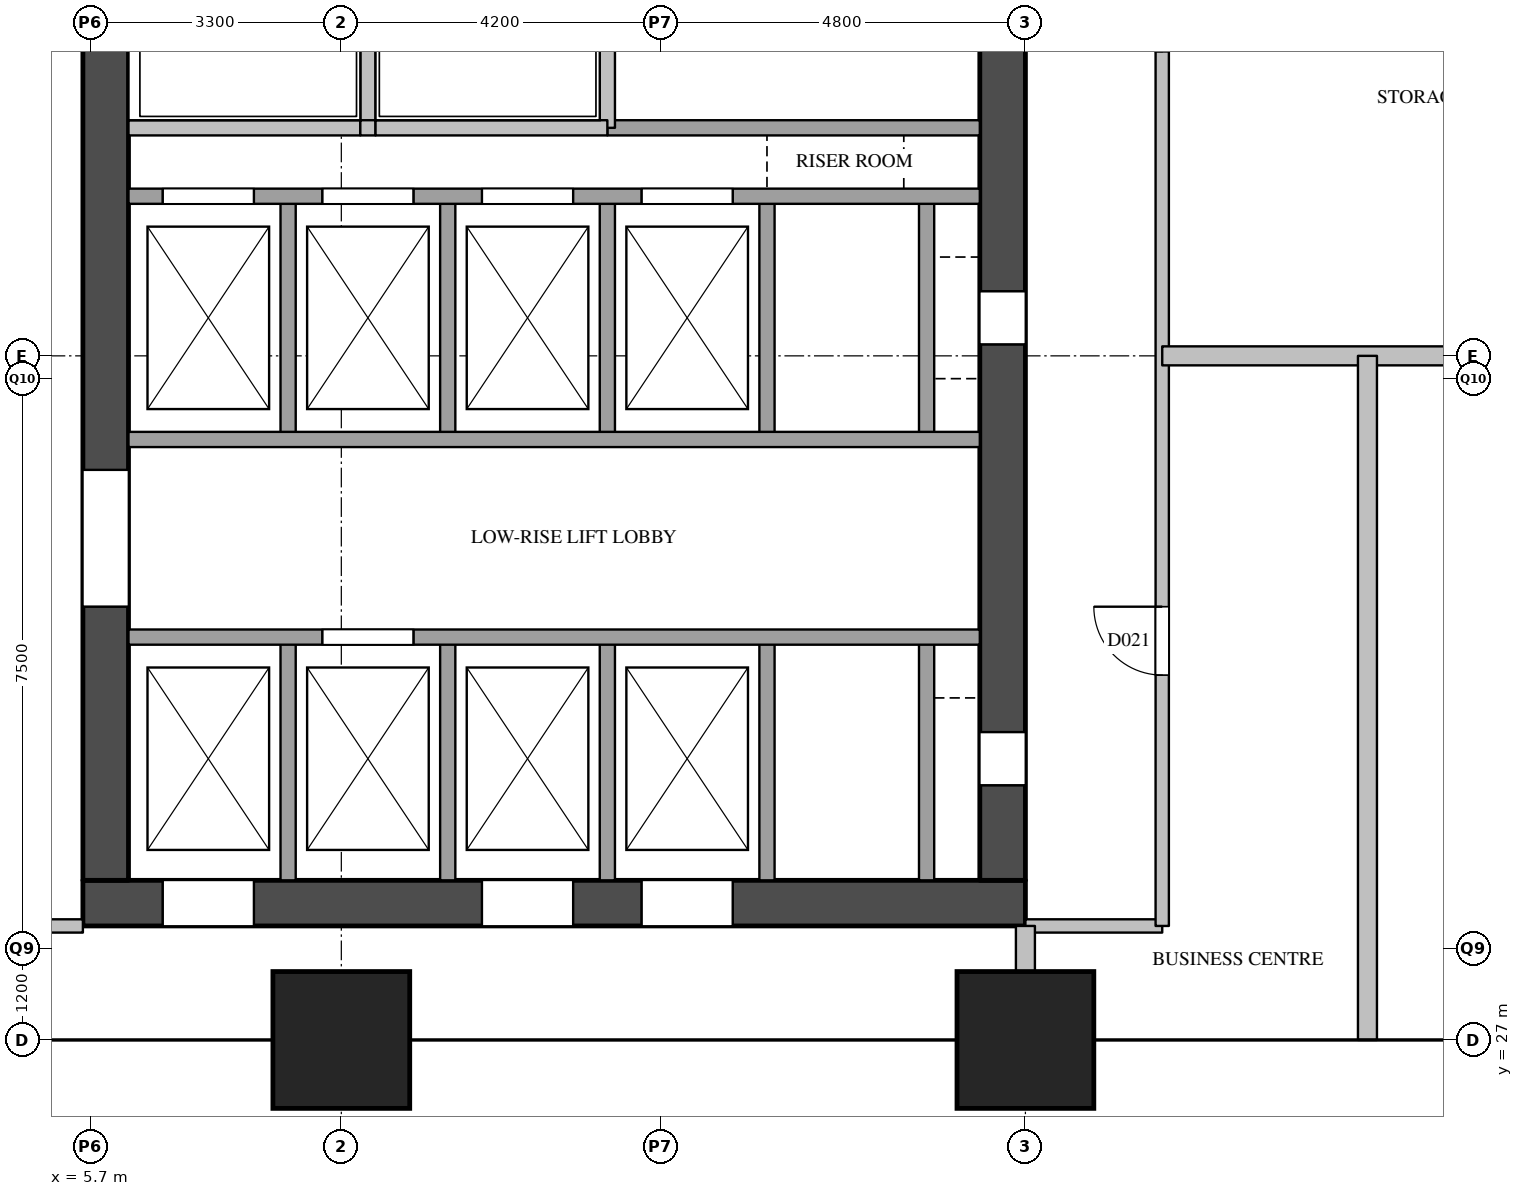
"""IFC4 building model, lengths in metres.
Left out: names, types, materials, properties, quantities, classifications, styles, units other than length and angle.
Written with IfcOpenShell. Run it as: python <this file> out.ifc"""

import sys

from ifc_helpers import new_model, si_unit, direction, frame, frame_2d, origin, origin_2d, place, context, subcontext, project, spatial, rectangle, extrude, element, fill, save


model = new_model("IFC4")
c1 = context("Model", 3, precision=1e-05, world=origin(), true_north=direction((0.0, 1.0)))
c2 = subcontext(c1, "Body", "Model", "MODEL_VIEW")
j1 = project(units=[si_unit("LENGTHUNIT", "METRE"), si_unit("PLANEANGLEUNIT", "RADIAN")], contexts=[c1])
p1 = place(None, origin())
s1 = spatial("IfcSite", under=j1, at=p1, CompositionType="ELEMENT")
p2 = place(p1, origin())
s2 = spatial("IfcBuilding", under=s1, at=p2, CompositionType="ELEMENT")
p3 = place(p2, frame((0.0, 0.0, 104.4)))
s3 = spatial("IfcBuildingStorey", under=s2, at=p3, CompositionType="ELEMENT", Elevation=104.4)
for number, where, z_axis, x_axis in (
    (1, (9.0, 27.0, 0.0), (0.0, 0.0, 1.0), (1.0, 0.0, 0.0)),
    (2, (18.0, 27.0, 0.0), (0.0, 0.0, 1.0), (1.0, 0.0, 0.0)),
):
    element("IfcColumn", number, at=place(p3, frame(where, z_axis=z_axis, x_axis=x_axis)), inside=s3, PredefinedType="COLUMN", context=c2, shape_type="SweptSolid", body=[
        extrude(rectangle(XDim=1.8, YDim=1.8, at=origin_2d()), origin(), (0.0, 0.0, 1.0), 3.8),
    ])
p4 = place(p3, frame((5.6, 28.8, 0.0), z_axis=(0.0, 0.0, 1.0), x_axis=(1.0, 0.0, 0.0)))
e3 = element("IfcWall", 3, at=p4, inside=s3, PredefinedType="SHEAR", context=c2, shape_type="SweptSolid", body=[
    extrude(rectangle(XDim=12.4, YDim=0.6, at=frame_2d((6.2, 0.0))), origin(), (0.0, 0.0, 1.0), 3.5),
])
p5 = place(p4, frame((1.05, 0.0, 0.0)))
e4 = element("IfcOpeningElement", 4, at=p5, cuts=e3, PredefinedType="OPENING", context=c2, shape_type="SweptSolid", body=[
    extrude(rectangle(XDim=1.2, YDim=2.1, at=frame_2d((0.6, 1.05))), frame((0.0, 0.31, 0.0), z_axis=(0.0, -1.0, 0.0), x_axis=(1.0, 0.0, 0.0)), (0.0, 0.0, 1.0), 0.62),
])
p6 = place(p4, frame((5.25, 0.0, 0.0)))
e5 = element("IfcOpeningElement", 5, at=p6, cuts=e3, PredefinedType="OPENING", context=c2, shape_type="SweptSolid", body=[
    extrude(rectangle(XDim=1.2, YDim=2.1, at=frame_2d((0.6, 1.05))), frame((0.0, 0.31, 0.0), z_axis=(0.0, -1.0, 0.0), x_axis=(1.0, 0.0, 0.0)), (0.0, 0.0, 1.0), 0.62),
])
p7 = place(p4, frame((7.35, 0.0, 0.0)))
e6 = element("IfcOpeningElement", 6, at=p7, cuts=e3, PredefinedType="OPENING", context=c2, shape_type="SweptSolid", body=[
    extrude(rectangle(XDim=1.2, YDim=2.1, at=frame_2d((0.6, 1.05))), frame((0.0, 0.31, 0.0), z_axis=(0.0, -1.0, 0.0), x_axis=(1.0, 0.0, 0.0)), (0.0, 0.0, 1.0), 0.62),
])
p8 = place(p3, frame((5.9, 29.1, 0.0), z_axis=(0.0, 0.0, 1.0), x_axis=(0.0, 1.0, 0.0)))
e7 = element("IfcWall", 7, at=p8, inside=s3, PredefinedType="SHEAR", context=c2, shape_type="SweptSolid", body=[
    extrude(rectangle(XDim=20.3, YDim=0.6, at=frame_2d((10.15, 0.0))), origin(), (0.0, 0.0, 1.0), 3.5),
])
p9 = place(p8, frame((3.6, 0.0, 0.0)))
e8 = element("IfcOpeningElement", 8, at=p9, cuts=e7, PredefinedType="OPENING", context=c2, shape_type="SweptSolid", body=[
    extrude(rectangle(XDim=1.8, YDim=2.1, at=frame_2d((0.9, 1.05))), frame((0.0, 0.31, 0.0), z_axis=(0.0, -1.0, 0.0), x_axis=(1.0, 0.0, 0.0)), (0.0, 0.0, 1.0), 0.62),
])
p10 = place(p8, frame((16.4, 0.0, 0.0)))
e9 = element("IfcOpeningElement", 9, at=p10, cuts=e7, PredefinedType="OPENING", context=c2, shape_type="SweptSolid", body=[
    extrude(rectangle(XDim=1.0, YDim=2.1, at=frame_2d((0.5, 1.05))), frame((0.0, 0.31, 0.0), z_axis=(0.0, -1.0, 0.0), x_axis=(1.0, 0.0, 0.0)), (0.0, 0.0, 1.0), 0.62),
])
p11 = place(p3, frame((17.7, 29.1, 0.0), z_axis=(0.0, 0.0, 1.0), x_axis=(0.0, 1.0, 0.0)))
e10 = element("IfcWall", 10, at=p11, inside=s3, PredefinedType="SHEAR", context=c2, shape_type="SweptSolid", body=[
    extrude(rectangle(XDim=20.3, YDim=0.6, at=frame_2d((10.15, 0.0))), origin(), (0.0, 0.0, 1.0), 3.5),
])
p12 = place(p11, frame((1.25, 0.0, 0.0)))
e11 = element("IfcOpeningElement", 11, at=p12, cuts=e10, PredefinedType="OPENING", context=c2, shape_type="SweptSolid", body=[
    extrude(rectangle(XDim=0.7, YDim=2.1, at=frame_2d((0.35, 1.05))), frame((0.0, 0.31, 0.0), z_axis=(0.0, -1.0, 0.0), x_axis=(1.0, 0.0, 0.0)), (0.0, 0.0, 1.0), 0.62),
])
p13 = place(p11, frame((7.05, 0.0, 0.0)))
e12 = element("IfcOpeningElement", 12, at=p13, cuts=e10, PredefinedType="OPENING", context=c2, shape_type="SweptSolid", body=[
    extrude(rectangle(XDim=0.7, YDim=2.1, at=frame_2d((0.35, 1.05))), frame((0.0, 0.31, 0.0), z_axis=(0.0, -1.0, 0.0), x_axis=(1.0, 0.0, 0.0)), (0.0, 0.0, 1.0), 0.62),
])
p14 = place(p3, frame((8.3, 29.1, 0.0), z_axis=(0.0, 0.0, 1.0), x_axis=(0.0, 1.0, 0.0)))
e13 = element("IfcWall", 13, at=p14, inside=s3, PredefinedType="SOLIDWALL", context=c2, shape_type="SweptSolid", body=[
    extrude(rectangle(XDim=3.2, YDim=0.2, at=frame_2d((1.6, 0.0))), origin(), (0.0, 0.0, 1.0), 3.5),
])
p15 = place(p3, frame((8.3, 34.9, 0.0), z_axis=(0.0, 0.0, 1.0), x_axis=(0.0, 1.0, 0.0)))
e14 = element("IfcWall", 14, at=p15, inside=s3, PredefinedType="SOLIDWALL", context=c2, shape_type="SweptSolid", body=[
    extrude(rectangle(XDim=3.2, YDim=0.2, at=frame_2d((1.6, 0.0))), origin(), (0.0, 0.0, 1.0), 3.5),
])
p16 = place(p3, frame((9.35, 39.0, 0.0), z_axis=(0.0, 0.0, 1.0), x_axis=(0.0, 1.0, 0.0)))
e15 = element("IfcWall", 15, at=p16, inside=s3, PredefinedType="SOLIDWALL", context=c2, shape_type="SweptSolid", body=[
    extrude(rectangle(XDim=1.9, YDim=0.2, at=frame_2d((0.95, 0.0))), origin(), (0.0, 0.0, 1.0), 3.5),
])
p17 = place(p3, frame((10.4, 29.1, 0.0), z_axis=(0.0, 0.0, 1.0), x_axis=(0.0, 1.0, 0.0)))
e16 = element("IfcWall", 16, at=p17, inside=s3, PredefinedType="SOLIDWALL", context=c2, shape_type="SweptSolid", body=[
    extrude(rectangle(XDim=3.2, YDim=0.2, at=frame_2d((1.6, 0.0))), origin(), (0.0, 0.0, 1.0), 3.5),
])
p18 = place(p3, frame((10.4, 34.9, 0.0), z_axis=(0.0, 0.0, 1.0), x_axis=(0.0, 1.0, 0.0)))
e17 = element("IfcWall", 17, at=p18, inside=s3, PredefinedType="SOLIDWALL", context=c2, shape_type="SweptSolid", body=[
    extrude(rectangle(XDim=3.2, YDim=0.2, at=frame_2d((1.6, 0.0))), origin(), (0.0, 0.0, 1.0), 3.5),
])
p19 = place(p3, frame((12.5, 29.1, 0.0), z_axis=(0.0, 0.0, 1.0), x_axis=(0.0, 1.0, 0.0)))
e18 = element("IfcWall", 18, at=p19, inside=s3, PredefinedType="SOLIDWALL", context=c2, shape_type="SweptSolid", body=[
    extrude(rectangle(XDim=3.2, YDim=0.2, at=frame_2d((1.6, 0.0))), origin(), (0.0, 0.0, 1.0), 3.5),
])
p20 = place(p3, frame((12.5, 34.9, 0.0), z_axis=(0.0, 0.0, 1.0), x_axis=(0.0, 1.0, 0.0)))
e19 = element("IfcWall", 19, at=p20, inside=s3, PredefinedType="SOLIDWALL", context=c2, shape_type="SweptSolid", body=[
    extrude(rectangle(XDim=3.2, YDim=0.2, at=frame_2d((1.6, 0.0))), origin(), (0.0, 0.0, 1.0), 3.5),
])
p21 = place(p3, frame((12.5, 39.0, 0.0), z_axis=(0.0, 0.0, 1.0), x_axis=(0.0, 1.0, 0.0)))
e20 = element("IfcWall", 20, at=p21, inside=s3, PredefinedType="SOLIDWALL", context=c2, shape_type="SweptSolid", body=[
    extrude(rectangle(XDim=1.9, YDim=0.2, at=frame_2d((0.95, 0.0))), origin(), (0.0, 0.0, 1.0), 3.5),
])
p22 = place(p3, frame((14.6, 29.1, 0.0), z_axis=(0.0, 0.0, 1.0), x_axis=(0.0, 1.0, 0.0)))
e21 = element("IfcWall", 21, at=p22, inside=s3, PredefinedType="SOLIDWALL", context=c2, shape_type="SweptSolid", body=[
    extrude(rectangle(XDim=3.2, YDim=0.2, at=frame_2d((1.6, 0.0))), origin(), (0.0, 0.0, 1.0), 3.5),
])
p23 = place(p3, frame((14.6, 34.9, 0.0), z_axis=(0.0, 0.0, 1.0), x_axis=(0.0, 1.0, 0.0)))
e22 = element("IfcWall", 22, at=p23, inside=s3, PredefinedType="SOLIDWALL", context=c2, shape_type="SweptSolid", body=[
    extrude(rectangle(XDim=3.2, YDim=0.2, at=frame_2d((1.6, 0.0))), origin(), (0.0, 0.0, 1.0), 3.5),
])
p24 = place(p3, frame((16.7, 29.1, 0.0), z_axis=(0.0, 0.0, 1.0), x_axis=(0.0, 1.0, 0.0)))
e23 = element("IfcWall", 23, at=p24, inside=s3, PredefinedType="SOLIDWALL", context=c2, shape_type="SweptSolid", body=[
    extrude(rectangle(XDim=3.2, YDim=0.2, at=frame_2d((1.6, 0.0))), origin(), (0.0, 0.0, 1.0), 3.5),
])
p25 = place(p3, frame((16.7, 34.9, 0.0), z_axis=(0.0, 0.0, 1.0), x_axis=(0.0, 1.0, 0.0)))
e24 = element("IfcWall", 24, at=p25, inside=s3, PredefinedType="SOLIDWALL", context=c2, shape_type="SweptSolid", body=[
    extrude(rectangle(XDim=3.2, YDim=0.2, at=frame_2d((1.6, 0.0))), origin(), (0.0, 0.0, 1.0), 3.5),
])
p26 = place(p3, frame((6.2, 32.3, 0.0), z_axis=(0.0, 0.0, 1.0), x_axis=(1.0, 0.0, 0.0)))
e25 = element("IfcWall", 25, at=p26, inside=s3, PredefinedType="SOLIDWALL", context=c2, shape_type="SweptSolid", body=[
    extrude(rectangle(XDim=11.2, YDim=0.2, at=frame_2d((5.6, 0.0))), origin(), (0.0, 0.0, 1.0), 3.5),
])
p27 = place(p26, frame((2.55, 0.0, 0.0)))
e26 = element("IfcOpeningElement", 26, at=p27, cuts=e25, PredefinedType="OPENING", context=c2, shape_type="SweptSolid", body=[
    extrude(rectangle(XDim=1.2, YDim=2.1, at=frame_2d((0.6, 1.05))), frame((0.0, 0.11, 0.0), z_axis=(0.0, -1.0, 0.0), x_axis=(1.0, 0.0, 0.0)), (0.0, 0.0, 1.0), 0.22),
])
p28 = place(p3, frame((6.2, 34.9, 0.0), z_axis=(0.0, 0.0, 1.0), x_axis=(1.0, 0.0, 0.0)))
e27 = element("IfcWall", 27, at=p28, inside=s3, PredefinedType="SOLIDWALL", context=c2, shape_type="SweptSolid", body=[
    extrude(rectangle(XDim=11.2, YDim=0.2, at=frame_2d((5.6, 0.0))), origin(), (0.0, 0.0, 1.0), 3.5),
])
p29 = place(p3, frame((6.2, 38.1, 0.0), z_axis=(0.0, 0.0, 1.0), x_axis=(1.0, 0.0, 0.0)))
e28 = element("IfcWall", 28, at=p29, inside=s3, PredefinedType="SOLIDWALL", context=c2, shape_type="SweptSolid", body=[
    extrude(rectangle(XDim=11.2, YDim=0.2, at=frame_2d((5.6, 0.0))), origin(), (0.0, 0.0, 1.0), 3.5),
])
p30 = place(p29, frame((0.45, 0.0, 0.0)))
e29 = element("IfcOpeningElement", 29, at=p30, cuts=e28, PredefinedType="OPENING", context=c2, shape_type="SweptSolid", body=[
    extrude(rectangle(XDim=1.2, YDim=2.1, at=frame_2d((0.6, 1.05))), frame((0.0, 0.11, 0.0), z_axis=(0.0, -1.0, 0.0), x_axis=(1.0, 0.0, 0.0)), (0.0, 0.0, 1.0), 0.22),
])
p31 = place(p29, frame((2.55, 0.0, 0.0)))
e30 = element("IfcOpeningElement", 30, at=p31, cuts=e28, PredefinedType="OPENING", context=c2, shape_type="SweptSolid", body=[
    extrude(rectangle(XDim=1.2, YDim=2.1, at=frame_2d((0.6, 1.05))), frame((0.0, 0.11, 0.0), z_axis=(0.0, -1.0, 0.0), x_axis=(1.0, 0.0, 0.0)), (0.0, 0.0, 1.0), 0.22),
])
p32 = place(p29, frame((4.65, 0.0, 0.0)))
e31 = element("IfcOpeningElement", 31, at=p32, cuts=e28, PredefinedType="OPENING", context=c2, shape_type="SweptSolid", body=[
    extrude(rectangle(XDim=1.2, YDim=2.1, at=frame_2d((0.6, 1.05))), frame((0.0, 0.11, 0.0), z_axis=(0.0, -1.0, 0.0), x_axis=(1.0, 0.0, 0.0)), (0.0, 0.0, 1.0), 0.22),
])
p33 = place(p29, frame((6.75, 0.0, 0.0)))
e32 = element("IfcOpeningElement", 32, at=p33, cuts=e28, PredefinedType="OPENING", context=c2, shape_type="SweptSolid", body=[
    extrude(rectangle(XDim=1.2, YDim=2.1, at=frame_2d((0.6, 1.05))), frame((0.0, 0.11, 0.0), z_axis=(0.0, -1.0, 0.0), x_axis=(1.0, 0.0, 0.0)), (0.0, 0.0, 1.0), 0.22),
])
p34 = place(p3, frame((12.5, 39.0, 0.0), z_axis=(0.0, 0.0, 1.0), x_axis=(1.0, 0.0, 0.0)))
e33 = element("IfcWall", 33, at=p34, inside=s3, PredefinedType="SOLIDWALL", context=c2, shape_type="SweptSolid", body=[
    extrude(rectangle(XDim=4.9, YDim=0.2, at=frame_2d((2.45, 0.0))), origin(), (0.0, 0.0, 1.0), 3.5),
])
p35 = place(p3, frame((6.2, 39.0, 0.0), z_axis=(0.0, 0.0, 1.0), x_axis=(1.0, 0.0, 0.0)))
e34 = element("IfcWall", 34, at=p35, inside=s3, PredefinedType="SOLIDWALL", context=c2, shape_type="SweptSolid", body=[
    extrude(rectangle(XDim=3.05, YDim=0.2, at=frame_2d((1.525, 0.0))), origin(), (0.0, 0.0, 1.0), 3.5),
])
p36 = place(p3, frame((9.25, 39.0, 0.0), z_axis=(0.0, 0.0, 1.0), x_axis=(1.0, 0.0, 0.0)))
e35 = element("IfcWall", 35, at=p36, inside=s3, PredefinedType="SOLIDWALL", context=c2, shape_type="SweptSolid", body=[
    extrude(rectangle(XDim=0.2, YDim=0.2, at=frame_2d((0.1, 0.0))), origin(), (0.0, 0.0, 1.0), 3.5),
])
p37 = place(p3, frame((9.45, 39.0, 0.0), z_axis=(0.0, 0.0, 1.0), x_axis=(1.0, 0.0, 0.0)))
e36 = element("IfcWall", 36, at=p37, inside=s3, PredefinedType="SOLIDWALL", context=c2, shape_type="SweptSolid", body=[
    extrude(rectangle(XDim=3.05, YDim=0.2, at=frame_2d((1.525, 0.0))), origin(), (0.0, 0.0, 1.0), 3.5),
])
for number, where, z_axis, x_axis in (
    (37, (3.8, 28.5, 0.0), (0.0, 0.0, 1.0), (1.0, 0.0, 0.0)),
    (38, (18.0, 28.5, 0.0), (0.0, 0.0, 1.0), (1.0, 0.0, 0.0)),
):
    element("IfcWall", number, at=place(p3, frame(where, z_axis=z_axis, x_axis=x_axis)), inside=s3, PredefinedType="PARTITIONING", context=c2, shape_type="SweptSolid", body=[
        extrude(rectangle(XDim=1.8, YDim=0.175, at=frame_2d((0.9, 0.0))), origin(), (0.0, 0.0, 1.0), 3.5),
    ])
p38 = place(p3, frame((19.8, 28.5, 0.0), z_axis=(0.0, 0.0, 1.0), x_axis=(0.0, 1.0, 0.0)))
e39 = element("IfcWall", 39, at=p38, inside=s3, PredefinedType="PARTITIONING", context=c2, shape_type="SweptSolid", body=[
    extrude(rectangle(XDim=23.3, YDim=0.175, at=frame_2d((11.65, 0.0))), origin(), (0.0, 0.0, 1.0), 3.5),
])
p39 = place(p38, frame((3.3, 0.0, 0.0)))
e40 = element("IfcOpeningElement", 40, at=p39, cuts=e39, PredefinedType="OPENING", context=c2, shape_type="SweptSolid", body=[
    extrude(rectangle(XDim=0.9, YDim=2.1, at=frame_2d((0.45, 1.05))), frame((0.0, 0.097, 0.0), z_axis=(0.0, -1.0, 0.0), x_axis=(1.0, 0.0, 0.0)), (0.0, 0.0, 1.0), 0.195),
])
p40 = place(p38, frame((11.5, 0.0, 0.0)))
e41 = element("IfcOpeningElement", 41, at=p40, cuts=e39, PredefinedType="OPENING", context=c2, shape_type="SweptSolid", body=[
    extrude(rectangle(XDim=1.0, YDim=2.1, at=frame_2d((0.5, 1.05))), frame((0.0, 0.097, 0.0), z_axis=(0.0, -1.0, 0.0), x_axis=(1.0, 0.0, 0.0)), (0.0, 0.0, 1.0), 0.195),
])
p41 = place(p38, frame((19.45, 0.0, 0.0)))
e42 = element("IfcOpeningElement", 42, at=p41, cuts=e39, PredefinedType="OPENING", context=c2, shape_type="SweptSolid", body=[
    extrude(rectangle(XDim=0.9, YDim=2.1, at=frame_2d((0.45, 1.05))), frame((0.0, 0.097, 0.0), z_axis=(0.0, -1.0, 0.0), x_axis=(1.0, 0.0, 0.0)), (0.0, 0.0, 1.0), 0.195),
])
p42 = place(p3, frame((19.8, 36.0, 0.0), z_axis=(0.0, 0.0, 1.0), x_axis=(1.0, 0.0, 0.0)))
e43 = element("IfcWall", 43, at=p42, inside=s3, PredefinedType="PARTITIONING", context=c2, shape_type="SweptSolid", body=[
    extrude(rectangle(XDim=14.4, YDim=0.25, at=frame_2d((7.2, 0.0))), origin(), (0.0, 0.0, 1.0), 3.5),
])
p43 = place(p3, frame((18.0, 27.0, 0.0), z_axis=(0.0, 0.0, 1.0), x_axis=(0.0, 1.0, 0.0)))
e44 = element("IfcWall", 44, at=p43, inside=s3, PredefinedType="PARTITIONING", context=c2, shape_type="SweptSolid", body=[
    extrude(rectangle(XDim=1.5, YDim=0.25, at=frame_2d((0.75, 0.0))), origin(), (0.0, 0.0, 1.0), 3.5),
])
p44 = place(p3, frame((22.5, 27.0, 0.0), z_axis=(0.0, 0.0, 1.0), x_axis=(0.0, 1.0, 0.0)))
e45 = element("IfcWall", 45, at=p44, inside=s3, PredefinedType="PARTITIONING", context=c2, shape_type="SweptSolid", body=[
    extrude(rectangle(XDim=9.0, YDim=0.25, at=frame_2d((4.5, 0.0))), origin(), (0.0, 0.0, 1.0), 2.5),
])
p45 = place(p5, origin())
e46 = element("IfcDoor", 46, at=p45, inside=s3, OperationType="SLIDING_TO_LEFT", PredefinedType="DOOR", context=c2, shape_type="SweptSolid", body=[
    extrude(rectangle(XDim=1.2, YDim=2.1, at=frame_2d((0.6, 1.05))), frame((0.0, 0.025, 0.0), z_axis=(0.0, -1.0, 0.0), x_axis=(1.0, 0.0, 0.0)), (0.0, 0.0, 1.0), 0.05),
])
fill(e4, e46)
p46 = place(p27, origin())
e47 = element("IfcDoor", 47, at=p46, inside=s3, OperationType="SLIDING_TO_LEFT", PredefinedType="DOOR", context=c2, shape_type="SweptSolid", body=[
    extrude(rectangle(XDim=1.2, YDim=2.1, at=frame_2d((0.6, 1.05))), frame((0.0, 0.025, 0.0), z_axis=(0.0, -1.0, 0.0), x_axis=(1.0, 0.0, 0.0)), (0.0, 0.0, 1.0), 0.05),
])
fill(e26, e47)
p47 = place(p6, origin())
e48 = element("IfcDoor", 48, at=p47, inside=s3, OperationType="SLIDING_TO_LEFT", PredefinedType="DOOR", context=c2, shape_type="SweptSolid", body=[
    extrude(rectangle(XDim=1.2, YDim=2.1, at=frame_2d((0.6, 1.05))), frame((0.0, 0.025, 0.0), z_axis=(0.0, -1.0, 0.0), x_axis=(1.0, 0.0, 0.0)), (0.0, 0.0, 1.0), 0.05),
])
fill(e5, e48)
p48 = place(p7, origin())
e49 = element("IfcDoor", 49, at=p48, inside=s3, OperationType="SLIDING_TO_LEFT", PredefinedType="DOOR", context=c2, shape_type="SweptSolid", body=[
    extrude(rectangle(XDim=1.2, YDim=2.1, at=frame_2d((0.6, 1.05))), frame((0.0, 0.025, 0.0), z_axis=(0.0, -1.0, 0.0), x_axis=(1.0, 0.0, 0.0)), (0.0, 0.0, 1.0), 0.05),
])
fill(e6, e49)
p49 = place(p30, origin())
e50 = element("IfcDoor", 50, at=p49, inside=s3, OperationType="SLIDING_TO_LEFT", PredefinedType="DOOR", context=c2, shape_type="SweptSolid", body=[
    extrude(rectangle(XDim=1.2, YDim=2.1, at=frame_2d((0.6, 1.05))), frame((0.0, 0.025, 0.0), z_axis=(0.0, -1.0, 0.0), x_axis=(1.0, 0.0, 0.0)), (0.0, 0.0, 1.0), 0.05),
])
fill(e29, e50)
p50 = place(p31, origin())
e51 = element("IfcDoor", 51, at=p50, inside=s3, OperationType="SLIDING_TO_LEFT", PredefinedType="DOOR", context=c2, shape_type="SweptSolid", body=[
    extrude(rectangle(XDim=1.2, YDim=2.1, at=frame_2d((0.6, 1.05))), frame((0.0, 0.025, 0.0), z_axis=(0.0, -1.0, 0.0), x_axis=(1.0, 0.0, 0.0)), (0.0, 0.0, 1.0), 0.05),
])
fill(e30, e51)
p51 = place(p32, origin())
e52 = element("IfcDoor", 52, at=p51, inside=s3, OperationType="SLIDING_TO_LEFT", PredefinedType="DOOR", context=c2, shape_type="SweptSolid", body=[
    extrude(rectangle(XDim=1.2, YDim=2.1, at=frame_2d((0.6, 1.05))), frame((0.0, 0.025, 0.0), z_axis=(0.0, -1.0, 0.0), x_axis=(1.0, 0.0, 0.0)), (0.0, 0.0, 1.0), 0.05),
])
fill(e31, e52)
p52 = place(p33, origin())
e53 = element("IfcDoor", 53, at=p52, inside=s3, OperationType="SLIDING_TO_LEFT", PredefinedType="DOOR", context=c2, shape_type="SweptSolid", body=[
    extrude(rectangle(XDim=1.2, YDim=2.1, at=frame_2d((0.6, 1.05))), frame((0.0, 0.025, 0.0), z_axis=(0.0, -1.0, 0.0), x_axis=(1.0, 0.0, 0.0)), (0.0, 0.0, 1.0), 0.05),
])
fill(e32, e53)
p53 = place(p12, origin())
e54 = element("IfcDoor", 54, at=p53, inside=s3, OperationType="SINGLE_SWING_LEFT", PredefinedType="DOOR", context=c2, shape_type="SweptSolid", body=[
    extrude(rectangle(XDim=0.7, YDim=2.1, at=frame_2d((0.35, 1.05))), frame((0.0, 0.025, 0.0), z_axis=(0.0, -1.0, 0.0), x_axis=(1.0, 0.0, 0.0)), (0.0, 0.0, 1.0), 0.05),
])
fill(e11, e54)
p54 = place(p13, origin())
e55 = element("IfcDoor", 55, at=p54, inside=s3, OperationType="SINGLE_SWING_LEFT", PredefinedType="DOOR", context=c2, shape_type="SweptSolid", body=[
    extrude(rectangle(XDim=0.7, YDim=2.1, at=frame_2d((0.35, 1.05))), frame((0.0, 0.025, 0.0), z_axis=(0.0, -1.0, 0.0), x_axis=(1.0, 0.0, 0.0)), (0.0, 0.0, 1.0), 0.05),
])
fill(e12, e55)
p55 = place(p9, origin())
e56 = element("IfcDoor", 56, at=p55, inside=s3, OperationType="DOUBLE_DOOR_SINGLE_SWING", PredefinedType="DOOR", context=c2, shape_type="SweptSolid", body=[
    extrude(rectangle(XDim=1.8, YDim=2.1, at=frame_2d((0.9, 1.05))), frame((0.0, 0.025, 0.0), z_axis=(0.0, -1.0, 0.0), x_axis=(1.0, 0.0, 0.0)), (0.0, 0.0, 1.0), 0.05),
])
fill(e8, e56)
p56 = place(p39, origin())
e57 = element("IfcDoor", 57, at=p56, inside=s3, OperationType="SINGLE_SWING_RIGHT", PredefinedType="DOOR", context=c2, shape_type="SweptSolid", body=[
    extrude(rectangle(XDim=0.9, YDim=2.1, at=frame_2d((0.45, 1.05))), frame((0.0, 0.025, 0.0), z_axis=(0.0, -1.0, 0.0), x_axis=(1.0, 0.0, 0.0)), (0.0, 0.0, 1.0), 0.05),
])
fill(e40, e57)
save(model, sys.argv[1])
